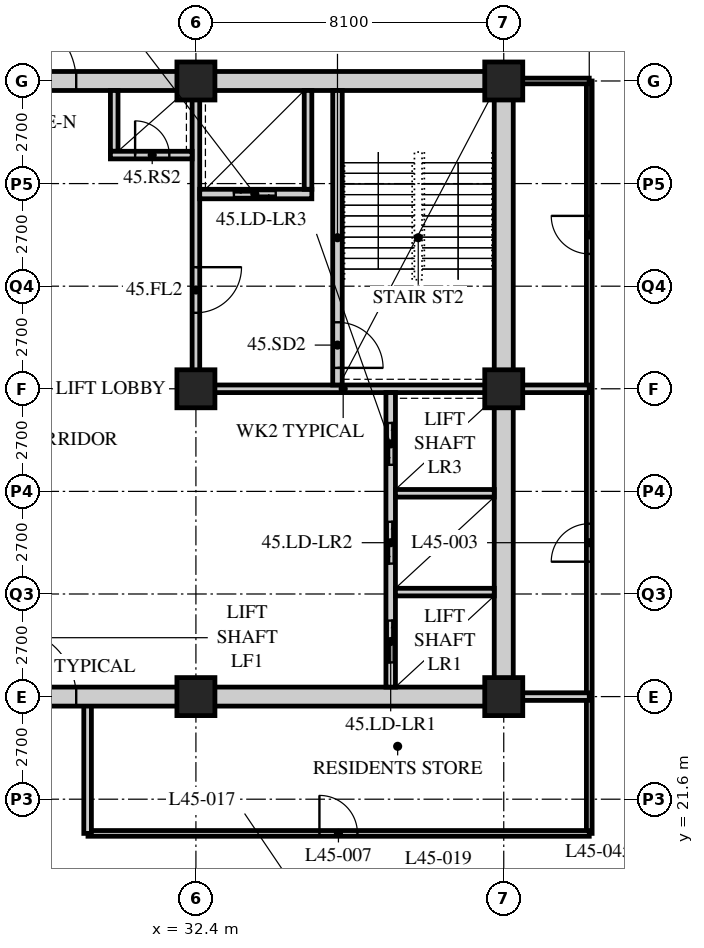
"""IFC4 building model, lengths in metres.
Left out: names, types, materials, properties, quantities, classifications, styles, units other than length and angle.
Written with IfcOpenShell. Run it as: python <this file> out.ifc"""

import sys

from ifc_helpers import new_model, si_unit, direction, frame, frame_2d, origin, origin_2d, place, context, subcontext, project, spatial, rectangle, hollow_rectangle, extrude, element, fill, save


model = new_model("IFC4")
c1 = context("Model", 3, precision=1e-05, world=origin(), true_north=direction((0.0, 1.0)))
c2 = subcontext(c1, "Body", "Model", "MODEL_VIEW")
j1 = project(units=[si_unit("LENGTHUNIT", "METRE"), si_unit("PLANEANGLEUNIT", "RADIAN")], contexts=[c1])
p1 = place(None, origin())
s1 = spatial("IfcSite", under=j1, at=p1, CompositionType="ELEMENT")
p2 = place(p1, origin())
s2 = spatial("IfcBuilding", under=s1, at=p2, CompositionType="ELEMENT")
p3 = place(p2, frame((0.0, 0.0, 177.6)))
s3 = spatial("IfcBuildingStorey", under=s2, at=p3, CompositionType="ELEMENT", Elevation=177.6)
for number, where, z_axis, x_axis in (
    (1, (32.4, 24.3, 0.0), (0.0, 0.0, 1.0), (1.0, 0.0, 0.0)),
    (2, (32.4, 32.4, 0.0), (0.0, 0.0, 1.0), (1.0, 0.0, 0.0)),
    (3, (32.4, 40.5, 0.0), (0.0, 0.0, 1.0), (1.0, 0.0, 0.0)),
    (4, (40.5, 24.3, 0.0), (0.0, 0.0, 1.0), (1.0, 0.0, 0.0)),
    (5, (40.5, 32.4, 0.0), (0.0, 0.0, 1.0), (1.0, 0.0, 0.0)),
    (6, (40.5, 40.5, 0.0), (0.0, 0.0, 1.0), (1.0, 0.0, 0.0)),
):
    element("IfcColumn", number, at=place(p3, frame(where, z_axis=z_axis, x_axis=x_axis)), inside=s3, PredefinedType="COLUMN", context=c2, shape_type="SweptSolid", body=[
        extrude(hollow_rectangle(XDim=1.0, YDim=1.0, WallThickness=0.1, at=origin_2d()), origin(), (0.0, 0.0, 1.0), 3.6),
    ])
p4 = place(p3, frame((42.75, 20.7, 0.0), z_axis=(0.0, 0.0, 1.0), x_axis=(0.0, 1.0, 0.0)))
e7 = element("IfcWall", 7, at=p4, inside=s3, PredefinedType="PARTITIONING", context=c2, shape_type="SweptSolid", body=[
    extrude(rectangle(XDim=19.8, YDim=0.15, at=frame_2d((9.9, 0.0))), origin(), (0.0, 0.0, 1.0), 3.39),
])
p5 = place(p4, frame((7.15, 0.0, 0.0)))
e8 = element("IfcOpeningElement", 8, at=p5, cuts=e7, PredefinedType="OPENING", context=c2, shape_type="SweptSolid", body=[
    extrude(rectangle(XDim=1.0, YDim=2.1, at=frame_2d((0.5, 1.05))), frame((0.0, 0.085, 0.0), z_axis=(0.0, -1.0, 0.0), x_axis=(1.0, 0.0, 0.0)), (0.0, 0.0, 1.0), 0.17),
])
p6 = place(p4, frame((15.25, 0.0, 0.0)))
e9 = element("IfcOpeningElement", 9, at=p6, cuts=e7, PredefinedType="OPENING", context=c2, shape_type="SweptSolid", body=[
    extrude(rectangle(XDim=1.0, YDim=2.1, at=frame_2d((0.5, 1.05))), frame((0.0, 0.085, 0.0), z_axis=(0.0, -1.0, 0.0), x_axis=(1.0, 0.0, 0.0)), (0.0, 0.0, 1.0), 0.17),
])
p7 = place(p3, frame((42.75, 40.5, 0.0), z_axis=(0.0, 0.0, 1.0), x_axis=(-1.0, 0.0, 0.0)))
e10 = element("IfcWall", 10, at=p7, inside=s3, PredefinedType="PARTITIONING", context=c2, shape_type="SweptSolid", body=[
    extrude(rectangle(XDim=2.05, YDim=0.15, at=frame_2d((1.025, 0.0))), origin(), (0.0, 0.0, 1.0), 3.39),
])
p8 = place(p3, frame((29.56, 20.7, 0.0), z_axis=(0.0, 0.0, 1.0), x_axis=(1.0, 0.0, 0.0)))
e11 = element("IfcWall", 11, at=p8, inside=s3, PredefinedType="PARTITIONING", context=c2, shape_type="SweptSolid", body=[
    extrude(rectangle(XDim=13.19, YDim=0.15, at=frame_2d((6.595, 0.0))), origin(), (0.0, 0.0, 1.0), 3.39),
])
p9 = place(p8, frame((6.09, 0.0, 0.0)))
e12 = element("IfcOpeningElement", 12, at=p9, cuts=e11, PredefinedType="OPENING", context=c2, shape_type="SweptSolid", body=[
    extrude(rectangle(XDim=1.0, YDim=2.1, at=frame_2d((0.5, 1.05))), frame((0.0, 0.085, 0.0), z_axis=(0.0, -1.0, 0.0), x_axis=(1.0, 0.0, 0.0)), (0.0, 0.0, 1.0), 0.17),
])
p10 = place(p3, frame((40.5, 32.4, 0.0), z_axis=(0.0, 0.0, 1.0), x_axis=(1.0, 0.0, 0.0)))
e13 = element("IfcWall", 13, at=p10, inside=s3, PredefinedType="SOLIDWALL", context=c2, shape_type="SweptSolid", body=[
    extrude(rectangle(XDim=2.25, YDim=0.2, at=frame_2d((1.125, 0.0))), origin(), (0.0, 0.0, 1.0), 3.39),
])
p11 = place(p3, frame((29.55, 20.7, 0.0), z_axis=(0.0, 0.0, 1.0), x_axis=(0.0, 1.0, 0.0)))
e14 = element("IfcWall", 14, at=p11, inside=s3, PredefinedType="SOLIDWALL", context=c2, shape_type="SweptSolid", body=[
    extrude(rectangle(XDim=3.6, YDim=0.2, at=frame_2d((1.8, 0.0))), origin(), (0.0, 0.0, 1.0), 3.39),
])
p12 = place(p3, frame((40.5, 24.3, 0.0), z_axis=(0.0, 0.0, 1.0), x_axis=(1.0, 0.0, 0.0)))
e15 = element("IfcWall", 15, at=p12, inside=s3, PredefinedType="SOLIDWALL", context=c2, shape_type="SweptSolid", body=[
    extrude(rectangle(XDim=2.25, YDim=0.2, at=frame_2d((1.125, 0.0))), origin(), (0.0, 0.0, 1.0), 3.39),
])
p13 = place(p3, frame((15.95, 24.3, 0.0), z_axis=(0.0, 0.0, 1.0), x_axis=(1.0, 0.0, 0.0)))
e16 = element("IfcWall", 16, at=p13, inside=s3, PredefinedType="SOLIDWALL", context=c2, shape_type="SweptSolid", body=[
    extrude(rectangle(XDim=24.8, YDim=0.5, at=frame_2d((12.4, 0.0))), origin(), (0.0, 0.0, 1.0), 2.74),
])
p14 = place(p13, frame((11.5, 0.0, 0.0)))
e17 = element("IfcOpeningElement", 17, at=p14, cuts=e16, PredefinedType="OPENING", context=c2, shape_type="SweptSolid", body=[
    extrude(rectangle(XDim=1.8, YDim=2.4, at=frame_2d((0.9, 1.2))), frame((0.0, 0.26, 0.0), z_axis=(0.0, -1.0, 0.0), x_axis=(1.0, 0.0, 0.0)), (0.0, 0.0, 1.0), 0.52),
])
p15 = place(p3, frame((15.95, 40.5, 0.0), z_axis=(0.0, 0.0, 1.0), x_axis=(1.0, 0.0, 0.0)))
e18 = element("IfcWall", 18, at=p15, inside=s3, PredefinedType="SOLIDWALL", context=c2, shape_type="SweptSolid", body=[
    extrude(rectangle(XDim=24.8, YDim=0.5, at=frame_2d((12.4, 0.0))), origin(), (0.0, 0.0, 1.0), 2.74),
])
p16 = place(p15, frame((11.5, 0.0, 0.0)))
e19 = element("IfcOpeningElement", 19, at=p16, cuts=e18, PredefinedType="OPENING", context=c2, shape_type="SweptSolid", body=[
    extrude(rectangle(XDim=1.8, YDim=2.4, at=frame_2d((0.9, 1.2))), frame((0.0, 0.26, 0.0), z_axis=(0.0, -1.0, 0.0), x_axis=(1.0, 0.0, 0.0)), (0.0, 0.0, 1.0), 0.52),
])
p17 = place(p3, frame((40.5, 24.55, 0.0), z_axis=(0.0, 0.0, 1.0), x_axis=(0.0, 1.0, 0.0)))
e20 = element("IfcWall", 20, at=p17, inside=s3, PredefinedType="SOLIDWALL", context=c2, shape_type="SweptSolid", body=[
    extrude(rectangle(XDim=15.7, YDim=0.5, at=frame_2d((7.85, 0.0))), origin(), (0.0, 0.0, 1.0), 2.778),
])
p18 = place(p3, frame((32.3, 32.4, 0.0), z_axis=(0.0, 0.0, 1.0), x_axis=(1.0, 0.0, 0.0)))
e21 = element("IfcWall", 21, at=p18, inside=s3, PredefinedType="SOLIDWALL", context=c2, shape_type="SweptSolid", body=[
    extrude(rectangle(XDim=7.95, YDim=0.2, at=frame_2d((3.975, 0.0))), origin(), (0.0, 0.0, 1.0), 2.778),
])
p19 = place(p3, frame((32.4, 32.5, 0.0), z_axis=(0.0, 0.0, 1.0), x_axis=(0.0, 1.0, 0.0)))
e22 = element("IfcWall", 22, at=p19, inside=s3, PredefinedType="SOLIDWALL", context=c2, shape_type="SweptSolid", body=[
    extrude(rectangle(XDim=7.75, YDim=0.2, at=frame_2d((3.875, 0.0))), origin(), (0.0, 0.0, 1.0), 2.778),
])
p20 = place(p19, frame((1.9, 0.0, 0.0)))
e23 = element("IfcOpeningElement", 23, at=p20, cuts=e22, PredefinedType="OPENING", context=c2, shape_type="SweptSolid", body=[
    extrude(rectangle(XDim=1.2, YDim=2.1, at=frame_2d((0.6, 1.05))), frame((0.0, 0.11, 0.0), z_axis=(0.0, -1.0, 0.0), x_axis=(1.0, 0.0, 0.0)), (0.0, 0.0, 1.0), 0.22),
])
p21 = place(p3, frame((37.525, 24.55, 0.0), z_axis=(0.0, 0.0, 1.0), x_axis=(0.0, 1.0, 0.0)))
e24 = element("IfcWall", 24, at=p21, inside=s3, PredefinedType="SOLIDWALL", context=c2, shape_type="SweptSolid", body=[
    extrude(rectangle(XDim=7.75, YDim=0.25, at=frame_2d((3.875, 0.0))), origin(), (0.0, 0.0, 1.0), 3.39),
])
p22 = place(p21, frame((0.65, 0.0, 0.0)))
e25 = element("IfcOpeningElement", 25, at=p22, cuts=e24, PredefinedType="OPENING", context=c2, shape_type="SweptSolid", body=[
    extrude(rectangle(XDim=1.1, YDim=2.4, at=frame_2d((0.55, 1.2))), frame((0.0, 0.135, 0.0), z_axis=(0.0, -1.0, 0.0), x_axis=(1.0, 0.0, 0.0)), (0.0, 0.0, 1.0), 0.27),
])
p23 = place(p21, frame((3.25, 0.0, 0.0)))
e26 = element("IfcOpeningElement", 26, at=p23, cuts=e24, PredefinedType="OPENING", context=c2, shape_type="SweptSolid", body=[
    extrude(rectangle(XDim=1.1, YDim=2.4, at=frame_2d((0.55, 1.2))), frame((0.0, 0.135, 0.0), z_axis=(0.0, -1.0, 0.0), x_axis=(1.0, 0.0, 0.0)), (0.0, 0.0, 1.0), 0.27),
])
p24 = place(p21, frame((5.85, 0.0, 0.0)))
e27 = element("IfcOpeningElement", 27, at=p24, cuts=e24, PredefinedType="OPENING", context=c2, shape_type="SweptSolid", body=[
    extrude(rectangle(XDim=1.1, YDim=2.4, at=frame_2d((0.55, 1.2))), frame((0.0, 0.135, 0.0), z_axis=(0.0, -1.0, 0.0), x_axis=(1.0, 0.0, 0.0)), (0.0, 0.0, 1.0), 0.27),
])
for number, where, z_axis, x_axis in (
    (28, (37.65, 27.05, 0.0), (0.0, 0.0, 1.0), (1.0, 0.0, 0.0)),
    (29, (37.65, 29.65, 0.0), (0.0, 0.0, 1.0), (1.0, 0.0, 0.0)),
):
    element("IfcWall", number, at=place(p3, frame(where, z_axis=z_axis, x_axis=x_axis)), inside=s3, PredefinedType="SOLIDWALL", context=c2, shape_type="SweptSolid", body=[
        extrude(rectangle(XDim=2.6, YDim=0.2, at=frame_2d((1.3, 0.0))), origin(), (0.0, 0.0, 1.0), 3.39),
    ])
p25 = place(p3, frame((36.125, 32.5, 0.0), z_axis=(0.0, 0.0, 1.0), x_axis=(0.0, 1.0, 0.0)))
e30 = element("IfcWall", 30, at=p25, inside=s3, PredefinedType="SOLIDWALL", context=c2, shape_type="SweptSolid", body=[
    extrude(rectangle(XDim=7.75, YDim=0.25, at=frame_2d((3.875, 0.0))), origin(), (0.0, 0.0, 1.0), 3.39),
])
p26 = place(p25, frame((0.45, 0.0, 0.0)))
e31 = element("IfcOpeningElement", 31, at=p26, cuts=e30, PredefinedType="OPENING", context=c2, shape_type="SweptSolid", body=[
    extrude(rectangle(XDim=1.2, YDim=2.1, at=frame_2d((0.6, 1.05))), frame((0.0, 0.135, 0.0), z_axis=(0.0, -1.0, 0.0), x_axis=(1.0, 0.0, 0.0)), (0.0, 0.0, 1.0), 0.27),
])
p27 = place(p3, frame((32.5, 37.525, 0.0), z_axis=(0.0, 0.0, 1.0), x_axis=(1.0, 0.0, 0.0)))
e32 = element("IfcWall", 32, at=p27, inside=s3, PredefinedType="SOLIDWALL", context=c2, shape_type="SweptSolid", body=[
    extrude(rectangle(XDim=2.95, YDim=0.25, at=frame_2d((1.475, 0.0))), origin(), (0.0, 0.0, 1.0), 3.39),
])
p28 = place(p27, frame((0.9, 0.0, 0.0)))
e33 = element("IfcOpeningElement", 33, at=p28, cuts=e32, PredefinedType="OPENING", context=c2, shape_type="SweptSolid", body=[
    extrude(rectangle(XDim=1.1, YDim=2.4, at=frame_2d((0.55, 1.2))), frame((0.0, 0.135, 0.0), z_axis=(0.0, -1.0, 0.0), x_axis=(1.0, 0.0, 0.0)), (0.0, 0.0, 1.0), 0.27),
])
p29 = place(p3, frame((35.35, 37.65, 0.0), z_axis=(0.0, 0.0, 1.0), x_axis=(0.0, 1.0, 0.0)))
e34 = element("IfcWall", 34, at=p29, inside=s3, PredefinedType="SOLIDWALL", context=c2, shape_type="SweptSolid", body=[
    extrude(rectangle(XDim=2.6, YDim=0.2, at=frame_2d((1.3, 0.0))), origin(), (0.0, 0.0, 1.0), 3.39),
])
p30 = place(p3, frame((30.25, 38.65, 0.0), z_axis=(0.0, 0.0, 1.0), x_axis=(0.0, 1.0, 0.0)))
e35 = element("IfcWall", 35, at=p30, inside=s3, PredefinedType="SOLIDWALL", context=c2, shape_type="SweptSolid", body=[
    extrude(rectangle(XDim=1.6, YDim=0.2, at=frame_2d((0.8, 0.0))), origin(), (0.0, 0.0, 1.0), 3.39),
])
p31 = place(p3, frame((30.15, 38.55, 0.0), z_axis=(0.0, 0.0, 1.0), x_axis=(1.0, 0.0, 0.0)))
e36 = element("IfcWall", 36, at=p31, inside=s3, PredefinedType="SOLIDWALL", context=c2, shape_type="SweptSolid", body=[
    extrude(rectangle(XDim=2.15, YDim=0.2, at=frame_2d((1.075, 0.0))), origin(), (0.0, 0.0, 1.0), 3.39),
])
p32 = place(p31, frame((0.65, 0.0, 0.0)))
e37 = element("IfcOpeningElement", 37, at=p32, cuts=e36, PredefinedType="OPENING", context=c2, shape_type="SweptSolid", body=[
    extrude(rectangle(XDim=0.9, YDim=2.1, at=frame_2d((0.45, 1.05))), frame((0.0, 0.11, 0.0), z_axis=(0.0, -1.0, 0.0), x_axis=(1.0, 0.0, 0.0)), (0.0, 0.0, 1.0), 0.22),
])
p33 = place(p5, origin())
e38 = element("IfcDoor", 38, at=p33, inside=s3, OperationType="SINGLE_SWING_LEFT", PredefinedType="DOOR", context=c2, shape_type="SweptSolid", body=[
    extrude(rectangle(XDim=1.0, YDim=2.1, at=frame_2d((0.5, 1.05))), frame((0.0, 0.025, 0.0), z_axis=(0.0, -1.0, 0.0), x_axis=(1.0, 0.0, 0.0)), (0.0, 0.0, 1.0), 0.05),
])
fill(e8, e38)
p34 = place(p6, origin())
e39 = element("IfcDoor", 39, at=p34, inside=s3, OperationType="SINGLE_SWING_RIGHT", PredefinedType="DOOR", context=c2, shape_type="SweptSolid", body=[
    extrude(rectangle(XDim=1.0, YDim=2.1, at=frame_2d((0.5, 1.05))), frame((0.0, 0.025, 0.0), z_axis=(0.0, -1.0, 0.0), x_axis=(1.0, 0.0, 0.0)), (0.0, 0.0, 1.0), 0.05),
])
fill(e9, e39)
p35 = place(p9, origin())
e40 = element("IfcDoor", 40, at=p35, inside=s3, OperationType="SINGLE_SWING_LEFT", PredefinedType="DOOR", context=c2, shape_type="SweptSolid", body=[
    extrude(rectangle(XDim=1.0, YDim=2.1, at=frame_2d((0.5, 1.05))), frame((0.0, 0.025, 0.0), z_axis=(0.0, -1.0, 0.0), x_axis=(1.0, 0.0, 0.0)), (0.0, 0.0, 1.0), 0.05),
])
fill(e12, e40)
p36 = place(p26, origin())
e41 = element("IfcDoor", 41, at=p36, inside=s3, OperationType="SINGLE_SWING_RIGHT", PredefinedType="DOOR", context=c2, shape_type="SweptSolid", body=[
    extrude(rectangle(XDim=1.2, YDim=2.1, at=frame_2d((0.6, 1.05))), frame((0.0, 0.025, 0.0), z_axis=(0.0, -1.0, 0.0), x_axis=(1.0, 0.0, 0.0)), (0.0, 0.0, 1.0), 0.05),
])
fill(e31, e41)
p37 = place(p20, origin())
e42 = element("IfcDoor", 42, at=p37, inside=s3, OperationType="SINGLE_SWING_LEFT", PredefinedType="DOOR", context=c2, shape_type="SweptSolid", body=[
    extrude(rectangle(XDim=1.2, YDim=2.1, at=frame_2d((0.6, 1.05))), frame((0.0, 0.025, 0.0), z_axis=(0.0, -1.0, 0.0), x_axis=(1.0, 0.0, 0.0)), (0.0, 0.0, 1.0), 0.05),
])
fill(e23, e42)
p38 = place(p32, origin())
e43 = element("IfcDoor", 43, at=p38, inside=s3, OperationType="SINGLE_SWING_LEFT", PredefinedType="DOOR", context=c2, shape_type="SweptSolid", body=[
    extrude(rectangle(XDim=0.9, YDim=2.1, at=frame_2d((0.45, 1.05))), frame((0.0, 0.025, 0.0), z_axis=(0.0, -1.0, 0.0), x_axis=(1.0, 0.0, 0.0)), (0.0, 0.0, 1.0), 0.05),
])
fill(e37, e43)
p39 = place(p22, origin())
e44 = element("IfcDoor", 44, at=p39, inside=s3, OperationType="DOUBLE_DOOR_SLIDING", PredefinedType="DOOR", context=c2, shape_type="SweptSolid", body=[
    extrude(rectangle(XDim=1.1, YDim=2.4, at=frame_2d((0.55, 1.2))), frame((0.0, 0.025, 0.0), z_axis=(0.0, -1.0, 0.0), x_axis=(1.0, 0.0, 0.0)), (0.0, 0.0, 1.0), 0.05),
])
fill(e25, e44)
p40 = place(p23, origin())
e45 = element("IfcDoor", 45, at=p40, inside=s3, OperationType="DOUBLE_DOOR_SLIDING", PredefinedType="DOOR", context=c2, shape_type="SweptSolid", body=[
    extrude(rectangle(XDim=1.1, YDim=2.4, at=frame_2d((0.55, 1.2))), frame((0.0, 0.025, 0.0), z_axis=(0.0, -1.0, 0.0), x_axis=(1.0, 0.0, 0.0)), (0.0, 0.0, 1.0), 0.05),
])
fill(e26, e45)
p41 = place(p24, origin())
e46 = element("IfcDoor", 46, at=p41, inside=s3, OperationType="DOUBLE_DOOR_SLIDING", PredefinedType="DOOR", context=c2, shape_type="SweptSolid", body=[
    extrude(rectangle(XDim=1.1, YDim=2.4, at=frame_2d((0.55, 1.2))), frame((0.0, 0.025, 0.0), z_axis=(0.0, -1.0, 0.0), x_axis=(1.0, 0.0, 0.0)), (0.0, 0.0, 1.0), 0.05),
])
fill(e27, e46)
p42 = place(p28, origin())
e47 = element("IfcDoor", 47, at=p42, inside=s3, OperationType="DOUBLE_DOOR_SLIDING", PredefinedType="DOOR", context=c2, shape_type="SweptSolid", body=[
    extrude(rectangle(XDim=1.1, YDim=2.4, at=frame_2d((0.55, 1.2))), frame((0.0, 0.025, 0.0), z_axis=(0.0, -1.0, 0.0), x_axis=(1.0, 0.0, 0.0)), (0.0, 0.0, 1.0), 0.05),
])
fill(e33, e47)
p43 = place(p14, origin())
e48 = element("IfcDoor", 48, at=p43, inside=s3, OperationType="DOUBLE_DOOR_SINGLE_SWING", PredefinedType="DOOR", context=c2, shape_type="SweptSolid", body=[
    extrude(rectangle(XDim=1.8, YDim=2.4, at=frame_2d((0.9, 1.2))), frame((0.0, 0.025, 0.0), z_axis=(0.0, -1.0, 0.0), x_axis=(1.0, 0.0, 0.0)), (0.0, 0.0, 1.0), 0.05),
])
fill(e17, e48)
p44 = place(p16, origin())
e49 = element("IfcDoor", 49, at=p44, inside=s3, OperationType="DOUBLE_DOOR_SINGLE_SWING", PredefinedType="DOOR", context=c2, shape_type="SweptSolid", body=[
    extrude(rectangle(XDim=1.8, YDim=2.4, at=frame_2d((0.9, 1.2))), frame((0.0, 0.025, 0.0), z_axis=(0.0, -1.0, 0.0), x_axis=(1.0, 0.0, 0.0)), (0.0, 0.0, 1.0), 0.05),
])
fill(e19, e49)
save(model, sys.argv[1])
